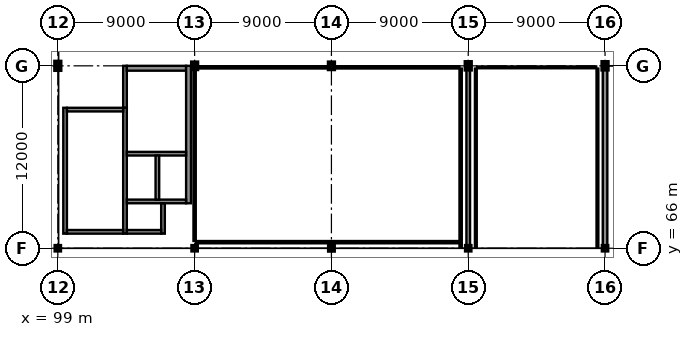
"""IFC4 building model, lengths in metres.
Left out: names, types, materials, properties, quantities, classifications, styles, units other than length and angle.
Written with IfcOpenShell. Run it as: python <this file> out.ifc"""

import sys

from ifc_helpers import new_model, si_unit, direction, frame, frame_2d, origin, origin_2d, place, context, subcontext, project, spatial, rectangle, i_section, extrude, element, fill, save


model = new_model("IFC4")
c1 = context("Model", 3, precision=1e-05, world=origin(), true_north=direction((0.0, 1.0)))
c2 = subcontext(c1, "Body", "Model", "MODEL_VIEW")
j1 = project(units=[si_unit("LENGTHUNIT", "METRE"), si_unit("PLANEANGLEUNIT", "RADIAN")], contexts=[c1])
p1 = place(None, origin())
s1 = spatial("IfcSite", under=j1, at=p1, CompositionType="ELEMENT")
p2 = place(p1, origin())
s2 = spatial("IfcBuilding", under=s1, at=p2, CompositionType="ELEMENT")
p3 = place(p2, frame((0.0, 0.0, 18.9)))
s3 = spatial("IfcBuildingStorey", under=s2, at=p3, CompositionType="ELEMENT", Elevation=18.9)
p4 = place(p3, frame((99.0, 66.0, 0.0), z_axis=(0.0, 0.0, 1.0), x_axis=(1.0, 0.0, 0.0)))
e1 = element("IfcColumn", 1, at=p4, inside=s3, PredefinedType="COLUMN", context=c2, shape_type="SweptSolid", body=[
    extrude(i_section(OverallWidth=0.26, OverallDepth=0.26, WebThickness=0.01, FlangeThickness=0.018, at=origin_2d()), origin(), (0.0, 0.0, 1.0), 4.3),
])
p5 = place(p3, frame((99.0, 78.0, 0.0), z_axis=(0.0, 0.0, 1.0), x_axis=(1.0, 0.0, 0.0)))
e2 = element("IfcColumn", 2, at=p5, inside=s3, PredefinedType="COLUMN", context=c2, shape_type="SweptSolid", body=[
    extrude(i_section(OverallWidth=0.3, OverallDepth=0.5, WebThickness=0.014, FlangeThickness=0.028, at=origin_2d()), origin(), (0.0, 0.0, 1.0), 4.3),
])
p6 = place(p3, frame((108.0, 66.0, 0.0), z_axis=(0.0, 0.0, 1.0), x_axis=(1.0, 0.0, 0.0)))
e3 = element("IfcColumn", 3, at=p6, inside=s3, PredefinedType="COLUMN", context=c2, shape_type="SweptSolid", body=[
    extrude(i_section(OverallWidth=0.26, OverallDepth=0.26, WebThickness=0.01, FlangeThickness=0.018, at=origin_2d()), origin(), (0.0, 0.0, 1.0), 4.3),
])
p7 = place(p3, frame((108.0, 78.0, 0.0), z_axis=(0.0, 0.0, 1.0), x_axis=(0.0, 1.0, 0.0)))
e4 = element("IfcColumn", 4, at=p7, inside=s3, PredefinedType="COLUMN", context=c2, shape_type="SweptSolid", body=[
    extrude(i_section(OverallWidth=0.3, OverallDepth=0.4, WebThickness=0.013, FlangeThickness=0.024, at=origin_2d()), origin(), (0.0, 0.0, 1.0), 4.3),
])
p8 = place(p3, frame((117.0, 66.0, 0.0), z_axis=(0.0, 0.0, 1.0), x_axis=(1.0, 0.0, 0.0)))
e5 = element("IfcColumn", 5, at=p8, inside=s3, PredefinedType="COLUMN", context=c2, shape_type="SweptSolid", body=[
    extrude(i_section(OverallWidth=0.28, OverallDepth=0.28, WebThickness=0.01, FlangeThickness=0.018, at=origin_2d()), origin(), (0.0, 0.0, 1.0), 4.3),
])
p9 = place(p3, frame((117.0, 78.0, 0.0), z_axis=(0.0, 0.0, 1.0), x_axis=(1.0, 0.0, 0.0)))
e6 = element("IfcColumn", 6, at=p9, inside=s3, PredefinedType="COLUMN", context=c2, shape_type="SweptSolid", body=[
    extrude(i_section(OverallWidth=0.3, OverallDepth=0.4, WebThickness=0.013, FlangeThickness=0.024, at=origin_2d()), origin(), (0.0, 0.0, 1.0), 4.3),
])
p10 = place(p3, frame((126.0, 66.0, 0.0), z_axis=(0.0, 0.0, 1.0), x_axis=(0.0, 1.0, 0.0)))
e7 = element("IfcColumn", 7, at=p10, inside=s3, PredefinedType="COLUMN", context=c2, shape_type="SweptSolid", body=[
    extrude(i_section(OverallWidth=0.26, OverallDepth=0.26, WebThickness=0.01, FlangeThickness=0.018, at=origin_2d()), origin(), (0.0, 0.0, 1.0), 4.3),
])
p11 = place(p3, frame((126.0, 78.0, 0.0), z_axis=(0.0, 0.0, 1.0), x_axis=(1.0, 0.0, 0.0)))
e8 = element("IfcColumn", 8, at=p11, inside=s3, PredefinedType="COLUMN", context=c2, shape_type="SweptSolid", body=[
    extrude(i_section(OverallWidth=0.3, OverallDepth=0.45, WebThickness=0.014, FlangeThickness=0.026, at=origin_2d()), origin(), (0.0, 0.0, 1.0), 4.3),
])
p12 = place(p3, frame((135.0, 66.0, 0.0), z_axis=(0.0, 0.0, 1.0), x_axis=(1.0, 0.0, 0.0)))
e9 = element("IfcColumn", 9, at=p12, inside=s3, PredefinedType="COLUMN", context=c2, shape_type="SweptSolid", body=[
    extrude(i_section(OverallWidth=0.26, OverallDepth=0.26, WebThickness=0.01, FlangeThickness=0.018, at=origin_2d()), origin(), (0.0, 0.0, 1.0), 4.3),
])
p13 = place(p3, frame((135.0, 78.0, 0.0), z_axis=(0.0, 0.0, 1.0), x_axis=(1.0, 0.0, 0.0)))
e10 = element("IfcColumn", 10, at=p13, inside=s3, PredefinedType="COLUMN", context=c2, shape_type="SweptSolid", body=[
    extrude(i_section(OverallWidth=0.3, OverallDepth=0.45, WebThickness=0.014, FlangeThickness=0.026, at=origin_2d()), origin(), (0.0, 0.0, 1.0), 4.3),
])
p14 = place(p3, frame((135.0, 66.128, 0.0), z_axis=(0.0, 0.0, 1.0), x_axis=(0.0, 1.0, 0.0)))
e11 = element("IfcWall", 11, at=p14, inside=s3, PredefinedType="SOLIDWALL", context=c2, shape_type="SweptSolid", body=[
    extrude(rectangle(XDim=11.649, YDim=0.3, at=frame_2d((5.825, 0.0))), origin(), (0.0, 0.0, 1.0), 3.855),
])
p15 = place(p14, frame((2.262, 0.0, 0.85)))
e12 = element("IfcOpeningElement", 12, at=p15, cuts=e11, PredefinedType="OPENING", context=c2, shape_type="SweptSolid", body=[
    extrude(rectangle(XDim=2.0, YDim=2.0, at=frame_2d((1.0, 1.0))), frame((0.0, 0.165, 0.0), z_axis=(0.0, -1.0, 0.0), x_axis=(1.0, 0.0, 0.0)), (0.0, 0.0, 1.0), 0.33),
])
p16 = place(p14, frame((7.387, 0.0, 0.85)))
e13 = element("IfcOpeningElement", 13, at=p16, cuts=e11, PredefinedType="OPENING", context=c2, shape_type="SweptSolid", body=[
    extrude(rectangle(XDim=2.0, YDim=2.0, at=frame_2d((1.0, 1.0))), frame((0.0, 0.165, 0.0), z_axis=(0.0, -1.0, 0.0), x_axis=(1.0, 0.0, 0.0)), (0.0, 0.0, 1.0), 0.33),
])
p17 = place(p3, frame((99.48, 66.96, 0.0), z_axis=(0.0, 0.0, 1.0), x_axis=(0.0, 1.0, 0.0)))
e14 = element("IfcWall", 14, at=p17, inside=s3, PredefinedType="SHEAR", context=c2, shape_type="SweptSolid", body=[
    extrude(rectangle(XDim=8.28, YDim=0.24, at=frame_2d((4.14, 0.0))), origin(), (0.0, 0.0, 1.0), 4.31),
])
p18 = place(p3, frame((103.42, 66.96, 0.0), z_axis=(0.0, 0.0, 1.0), x_axis=(0.0, 1.0, 0.0)))
e15 = element("IfcWall", 15, at=p18, inside=s3, PredefinedType="SHEAR", context=c2, shape_type="SweptSolid", body=[
    extrude(rectangle(XDim=8.28, YDim=0.24, at=frame_2d((4.14, 0.0))), origin(), (0.0, 0.0, 1.0), 4.31),
])
p19 = place(p18, frame((6.49, 0.0, 0.0)))
e16 = element("IfcOpeningElement", 16, at=p19, cuts=e15, PredefinedType="OPENING", context=c2, shape_type="SweptSolid", body=[
    extrude(rectangle(XDim=1.3, YDim=2.2, at=frame_2d((0.65, 1.1))), frame((0.0, 0.135, 0.0), z_axis=(0.0, -1.0, 0.0), x_axis=(1.0, 0.0, 0.0)), (0.0, 0.0, 1.0), 0.27),
])
for number, where, z_axis, x_axis in (
    (17, (99.6, 67.08, 0.0), (0.0, 0.0, 1.0), (1.0, 0.0, 0.0)),
    (18, (99.6, 75.12, 0.0), (0.0, 0.0, 1.0), (1.0, 0.0, 0.0)),
):
    element("IfcWall", number, at=place(p3, frame(where, z_axis=z_axis, x_axis=x_axis)), inside=s3, PredefinedType="SHEAR", context=c2, shape_type="SweptSolid", body=[
        extrude(rectangle(XDim=3.7, YDim=0.24, at=frame_2d((1.85, 0.0))), origin(), (0.0, 0.0, 1.0), 4.31),
    ])
p20 = place(p3, frame((103.42, 75.24, 0.0), z_axis=(0.0, 0.0, 1.0), x_axis=(0.0, 1.0, 0.0)))
e19 = element("IfcWall", 19, at=p20, inside=s3, PredefinedType="SHEAR", context=c2, shape_type="SweptSolid", body=[
    extrude(rectangle(XDim=2.76, YDim=0.24, at=frame_2d((1.38, 0.0))), origin(), (0.0, 0.0, 1.0), 4.16),
])
p21 = place(p3, frame((103.54, 77.84, 0.0), z_axis=(0.0, 0.0, 1.0), x_axis=(1.0, 0.0, 0.0)))
e20 = element("IfcWall", 20, at=p21, inside=s3, PredefinedType="SHEAR", context=c2, shape_type="SweptSolid", body=[
    extrude(rectangle(XDim=3.9, YDim=0.32, at=frame_2d((1.95, 0.0))), origin(), (0.0, 0.0, 1.0), 4.16),
])
p22 = place(p21, frame((1.225, 0.0, 0.0)))
e21 = element("IfcOpeningElement", 21, at=p22, cuts=e20, PredefinedType="OPENING", context=c2, shape_type="SweptSolid", body=[
    extrude(rectangle(XDim=1.45, YDim=2.2, at=frame_2d((0.725, 1.1))), frame((0.0, 0.175, 0.0), z_axis=(0.0, -1.0, 0.0), x_axis=(1.0, 0.0, 0.0)), (0.0, 0.0, 1.0), 0.35),
])
p23 = place(p3, frame((107.6, 68.96, 0.0), z_axis=(0.0, 0.0, 1.0), x_axis=(0.0, 1.0, 0.0)))
e22 = element("IfcWall", 22, at=p23, inside=s3, PredefinedType="SHEAR", context=c2, shape_type="SweptSolid", body=[
    extrude(rectangle(XDim=9.04, YDim=0.32, at=frame_2d((4.52, 0.0))), origin(), (0.0, 0.0, 1.0), 4.16),
])
p24 = place(p3, frame((103.54, 72.22, 0.0), z_axis=(0.0, 0.0, 1.0), x_axis=(1.0, 0.0, 0.0)))
e23 = element("IfcWall", 23, at=p24, inside=s3, PredefinedType="SHEAR", context=c2, shape_type="SweptSolid", body=[
    extrude(rectangle(XDim=3.9, YDim=0.24, at=frame_2d((1.95, 0.0))), origin(), (0.0, 0.0, 1.0), 4.31),
])
p25 = place(p24, frame((0.385, 0.0, 0.0)))
e24 = element("IfcOpeningElement", 24, at=p25, cuts=e23, PredefinedType="OPENING", context=c2, shape_type="SweptSolid", body=[
    extrude(rectangle(XDim=1.3, YDim=2.2, at=frame_2d((0.65, 1.1))), frame((0.0, 0.135, 0.0), z_axis=(0.0, -1.0, 0.0), x_axis=(1.0, 0.0, 0.0)), (0.0, 0.0, 1.0), 0.27),
])
p26 = place(p24, frame((2.335, 0.0, 0.0)))
e25 = element("IfcOpeningElement", 25, at=p26, cuts=e23, PredefinedType="OPENING", context=c2, shape_type="SweptSolid", body=[
    extrude(rectangle(XDim=1.3, YDim=2.2, at=frame_2d((0.65, 1.1))), frame((0.0, 0.135, 0.0), z_axis=(0.0, -1.0, 0.0), x_axis=(1.0, 0.0, 0.0)), (0.0, 0.0, 1.0), 0.27),
])
p27 = place(p3, frame((103.54, 69.08, 0.0), z_axis=(0.0, 0.0, 1.0), x_axis=(1.0, 0.0, 0.0)))
e26 = element("IfcWall", 26, at=p27, inside=s3, PredefinedType="SHEAR", context=c2, shape_type="SweptSolid", body=[
    extrude(rectangle(XDim=3.9, YDim=0.24, at=frame_2d((1.95, 0.0))), origin(), (0.0, 0.0, 1.0), 4.31),
])
p28 = place(p3, frame((105.55, 69.2, 0.0), z_axis=(0.0, 0.0, 1.0), x_axis=(0.0, 1.0, 0.0)))
e27 = element("IfcWall", 27, at=p28, inside=s3, PredefinedType="SHEAR", context=c2, shape_type="SweptSolid", body=[
    extrude(rectangle(XDim=2.9, YDim=0.24, at=frame_2d((1.45, 0.0))), origin(), (0.0, 0.0, 1.0), 4.31),
])
p29 = place(p3, frame((105.92, 66.96, 0.0), z_axis=(0.0, 0.0, 1.0), x_axis=(0.0, 1.0, 0.0)))
e28 = element("IfcWall", 28, at=p29, inside=s3, PredefinedType="SHEAR", context=c2, shape_type="SweptSolid", body=[
    extrude(rectangle(XDim=2.0, YDim=0.24, at=frame_2d((1.0, 0.0))), origin(), (0.0, 0.0, 1.0), 4.31),
])
p30 = place(p3, frame((103.54, 67.08, 0.0), z_axis=(0.0, 0.0, 1.0), x_axis=(1.0, 0.0, 0.0)))
e29 = element("IfcWall", 29, at=p30, inside=s3, PredefinedType="SHEAR", context=c2, shape_type="SweptSolid", body=[
    extrude(rectangle(XDim=2.26, YDim=0.24, at=frame_2d((1.13, 0.0))), origin(), (0.0, 0.0, 1.0), 4.31),
])
p31 = place(p3, frame((126.0, 66.008, 0.0), z_axis=(0.0, 0.0, 1.0), x_axis=(0.0, 1.0, 0.0)))
e30 = element("IfcWall", 30, at=p31, inside=s3, PredefinedType="SHEAR", context=c2, shape_type="SweptSolid", body=[
    extrude(rectangle(XDim=11.769, YDim=0.24, at=frame_2d((5.885, 0.0))), origin(), (0.0, 0.0, 1.0), 3.905),
])
p32 = place(p3, frame((125.5, 77.82, 0.0), z_axis=(0.0, 0.0, 1.0), x_axis=(0.0, -1.0, 0.0)))
e31 = element("IfcWall", 31, at=p32, inside=s3, PredefinedType="PARTITIONING", context=c2, shape_type="SweptSolid", body=[
    extrude(rectangle(XDim=11.745, YDim=0.15, at=frame_2d((5.873, 0.0))), origin(), (0.0, 0.0, 1.0), 4.14),
])
p33 = place(p3, frame((125.43, 66.4, 0.0), z_axis=(0.0, 0.0, 1.0), x_axis=(-1.0, 0.0, 0.0)))
e32 = element("IfcWall", 32, at=p33, inside=s3, PredefinedType="PARTITIONING", context=c2, shape_type="SweptSolid", body=[
    extrude(rectangle(XDim=17.35, YDim=0.15, at=frame_2d((8.675, 0.0))), origin(), (0.0, 0.0, 1.0), 4.14),
])
p34 = place(p3, frame((108.0, 66.48, 0.0), z_axis=(0.0, 0.0, 1.0), x_axis=(0.0, 1.0, 0.0)))
e33 = element("IfcWall", 33, at=p34, inside=s3, PredefinedType="PARTITIONING", context=c2, shape_type="SweptSolid", body=[
    extrude(rectangle(XDim=11.34, YDim=0.15, at=frame_2d((5.67, 0.0))), origin(), (0.0, 0.0, 1.0), 3.695),
])
p35 = place(p3, frame((107.798, 77.9, 0.0), z_axis=(0.0, 0.0, 1.0), x_axis=(1.0, 0.0, 0.0)))
e34 = element("IfcWall", 34, at=p35, inside=s3, PredefinedType="PARTITIONING", context=c2, shape_type="SweptSolid", body=[
    extrude(rectangle(XDim=17.622, YDim=0.15, at=frame_2d((8.811, 0.0))), origin(), (0.0, 0.0, 1.0), 3.705),
])
p36 = place(p35, frame((7.581, 0.0, 0.0)))
e35 = element("IfcOpeningElement", 35, at=p36, cuts=e34, PredefinedType="OPENING", context=c2, shape_type="SweptSolid", body=[
    extrude(rectangle(XDim=1.05, YDim=2.25, at=frame_2d((0.525, 1.125))), frame((0.0, 0.09, 0.0), z_axis=(0.0, -1.0, 0.0), x_axis=(1.0, 0.0, 0.0)), (0.0, 0.0, 1.0), 0.18),
])
p37 = place(p3, frame((126.5, 66.075, 0.0), z_axis=(0.0, 0.0, 1.0), x_axis=(0.0, 1.0, 0.0)))
e36 = element("IfcWall", 36, at=p37, inside=s3, PredefinedType="PARTITIONING", context=c2, shape_type="SweptSolid", body=[
    extrude(rectangle(XDim=11.745, YDim=0.12, at=frame_2d((5.873, 0.0))), origin(), (0.0, 0.0, 1.0), 4.14),
])
p38 = place(p3, frame((126.58, 77.9, 0.0), z_axis=(0.0, 0.0, 1.0), x_axis=(1.0, 0.0, 0.0)))
e37 = element("IfcWall", 37, at=p38, inside=s3, PredefinedType="PARTITIONING", context=c2, shape_type="SweptSolid", body=[
    extrude(rectangle(XDim=7.84, YDim=0.12, at=frame_2d((3.92, 0.0))), origin(), (0.0, 0.0, 1.0), 3.705),
])
p39 = place(p38, frame((3.47, 0.0, 0.0)))
e38 = element("IfcOpeningElement", 38, at=p39, cuts=e37, PredefinedType="OPENING", context=c2, shape_type="SweptSolid", body=[
    extrude(rectangle(XDim=0.9, YDim=2.1, at=frame_2d((0.45, 1.05))), frame((0.0, 0.075, 0.0), z_axis=(0.0, -1.0, 0.0), x_axis=(1.0, 0.0, 0.0)), (0.0, 0.0, 1.0), 0.15),
])
p40 = place(p3, frame((134.5, 77.82, 0.0), z_axis=(0.0, 0.0, 1.0), x_axis=(0.0, -1.0, 0.0)))
e39 = element("IfcWall", 39, at=p40, inside=s3, PredefinedType="PARTITIONING", context=c2, shape_type="SweptSolid", body=[
    extrude(rectangle(XDim=11.745, YDim=0.12, at=frame_2d((5.873, 0.0))), origin(), (0.0, 0.0, 1.0), 4.14),
])
p41 = place(p15, origin())
e40 = element("IfcWindow", 40, at=p41, inside=s3, PartitioningType="SINGLE_PANEL", PredefinedType="WINDOW", context=c2, shape_type="SweptSolid", body=[
    extrude(rectangle(XDim=2.0, YDim=2.0, at=frame_2d((1.0, 1.0))), frame((0.0, 0.03, 0.0), z_axis=(0.0, -1.0, 0.0), x_axis=(1.0, 0.0, 0.0)), (0.0, 0.0, 1.0), 0.06),
])
fill(e12, e40)
p42 = place(p16, origin())
e41 = element("IfcWindow", 41, at=p42, inside=s3, PartitioningType="SINGLE_PANEL", PredefinedType="WINDOW", context=c2, shape_type="SweptSolid", body=[
    extrude(rectangle(XDim=2.0, YDim=2.0, at=frame_2d((1.0, 1.0))), frame((0.0, 0.03, 0.0), z_axis=(0.0, -1.0, 0.0), x_axis=(1.0, 0.0, 0.0)), (0.0, 0.0, 1.0), 0.06),
])
fill(e13, e41)
p43 = place(p19, frame((1.3, 0.0, 0.0), z_axis=(0.0, 0.0, 1.0), x_axis=(-1.0, 0.0, 0.0)))
e42 = element("IfcDoor", 42, at=p43, inside=s3, OperationType="SINGLE_SWING_LEFT", PredefinedType="DOOR", context=c2, shape_type="SweptSolid", body=[
    extrude(rectangle(XDim=1.3, YDim=2.2, at=frame_2d((0.65, 1.1))), frame((0.0, 0.025, 0.0), z_axis=(0.0, -1.0, 0.0), x_axis=(1.0, 0.0, 0.0)), (0.0, 0.0, 1.0), 0.05),
])
fill(e16, e42)
p44 = place(p22, origin())
e43 = element("IfcDoor", 43, at=p44, inside=s3, OperationType="DOUBLE_DOOR_SINGLE_SWING", PredefinedType="DOOR", context=c2, shape_type="SweptSolid", body=[
    extrude(rectangle(XDim=1.45, YDim=2.2, at=frame_2d((0.725, 1.1))), frame((0.0, 0.025, 0.0), z_axis=(0.0, -1.0, 0.0), x_axis=(1.0, 0.0, 0.0)), (0.0, 0.0, 1.0), 0.05),
])
fill(e21, e43)
p45 = place(p25, origin())
e44 = element("IfcDoor", 44, at=p45, inside=s3, OperationType="DOUBLE_DOOR_SLIDING", PredefinedType="DOOR", context=c2, shape_type="SweptSolid", body=[
    extrude(rectangle(XDim=1.3, YDim=2.2, at=frame_2d((0.65, 1.1))), frame((0.0, 0.025, 0.0), z_axis=(0.0, -1.0, 0.0), x_axis=(1.0, 0.0, 0.0)), (0.0, 0.0, 1.0), 0.05),
])
fill(e24, e44)
p46 = place(p26, origin())
e45 = element("IfcDoor", 45, at=p46, inside=s3, OperationType="DOUBLE_DOOR_SLIDING", PredefinedType="DOOR", context=c2, shape_type="SweptSolid", body=[
    extrude(rectangle(XDim=1.3, YDim=2.2, at=frame_2d((0.65, 1.1))), frame((0.0, 0.025, 0.0), z_axis=(0.0, -1.0, 0.0), x_axis=(1.0, 0.0, 0.0)), (0.0, 0.0, 1.0), 0.05),
])
fill(e25, e45)
p47 = place(p36, frame((1.05, 0.0, 0.0), z_axis=(0.0, 0.0, 1.0), x_axis=(-1.0, 0.0, 0.0)))
e46 = element("IfcDoor", 46, at=p47, inside=s3, OperationType="SINGLE_SWING_RIGHT", PredefinedType="DOOR", context=c2, shape_type="SweptSolid", body=[
    extrude(rectangle(XDim=1.05, YDim=2.25, at=frame_2d((0.525, 1.125))), frame((0.0, 0.025, 0.0), z_axis=(0.0, -1.0, 0.0), x_axis=(1.0, 0.0, 0.0)), (0.0, 0.0, 1.0), 0.05),
])
fill(e35, e46)
p48 = place(p39, origin())
e47 = element("IfcDoor", 47, at=p48, inside=s3, OperationType="SINGLE_SWING_LEFT", PredefinedType="DOOR", context=c2, shape_type="SweptSolid", body=[
    extrude(rectangle(XDim=0.9, YDim=2.1, at=frame_2d((0.45, 1.05))), frame((0.0, 0.025, 0.0), z_axis=(0.0, -1.0, 0.0), x_axis=(1.0, 0.0, 0.0)), (0.0, 0.0, 1.0), 0.05),
])
fill(e38, e47)
save(model, sys.argv[1])
